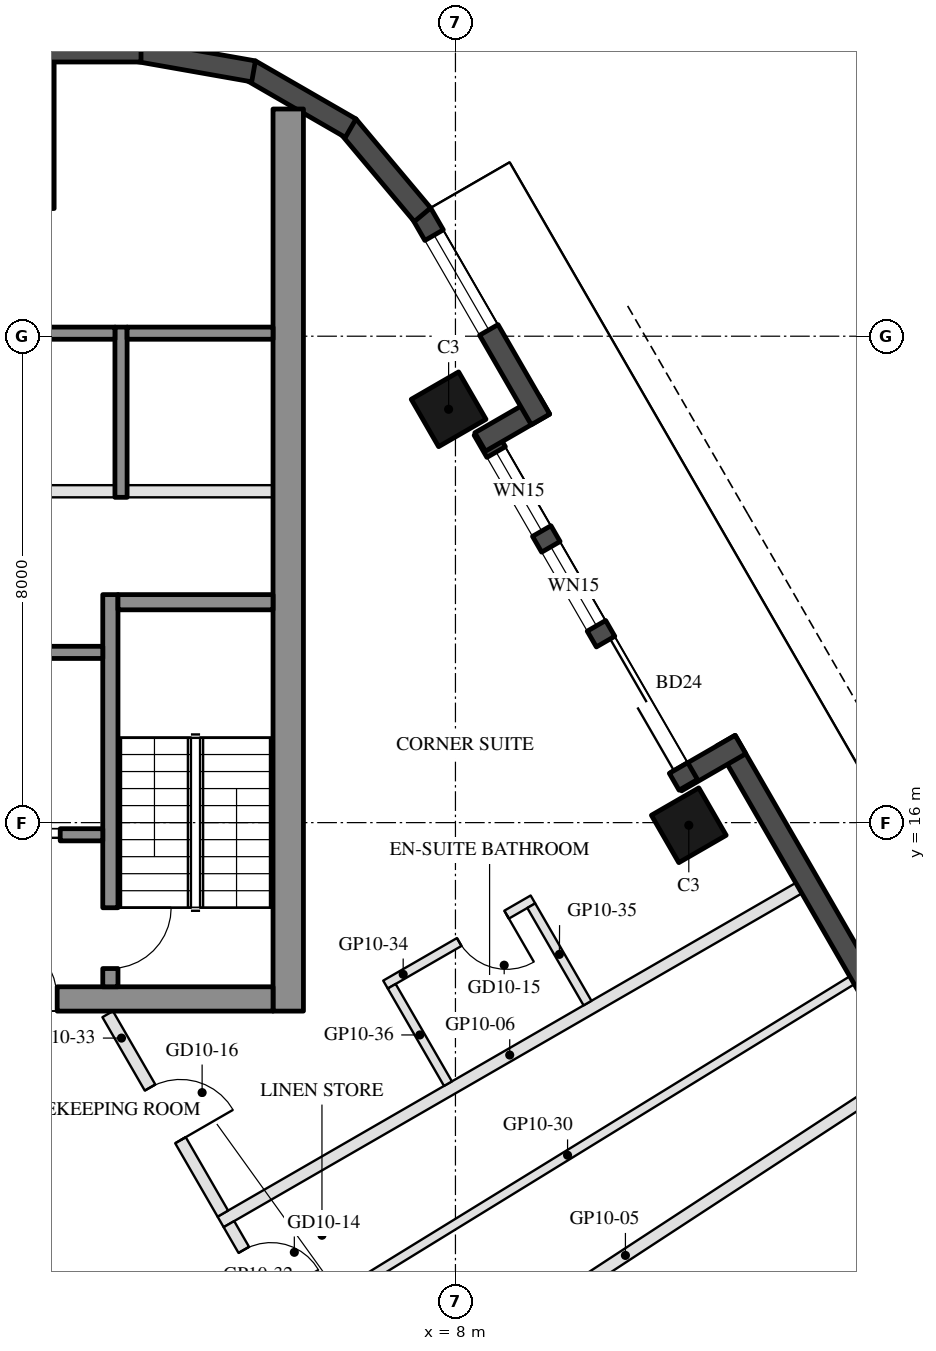
"""IFC4 building model, lengths in metres.
Left out: names, types, materials, properties, quantities, classifications, styles, units other than length and angle.
Written with IfcOpenShell. Run it as: python <this file> out.ifc"""

import sys

from ifc_helpers import new_model, si_unit, direction, frame, frame_2d, origin, origin_2d, place, context, subcontext, project, spatial, rectangle, hollow_rectangle, extrude, element, fill, save


model = new_model("IFC4")
c1 = context("Model", 3, precision=1e-05, world=origin(), true_north=direction((0.0, 1.0)))
c2 = subcontext(c1, "Body", "Model", "MODEL_VIEW")
j1 = project(units=[si_unit("LENGTHUNIT", "METRE"), si_unit("PLANEANGLEUNIT", "RADIAN")], contexts=[c1])
p1 = place(None, origin())
s1 = spatial("IfcSite", under=j1, at=p1, CompositionType="ELEMENT")
p2 = place(p1, origin())
s2 = spatial("IfcBuilding", under=s1, at=p2, CompositionType="ELEMENT")
p3 = place(p2, frame((0.0, 0.0, 120.5)))
s3 = spatial("IfcBuildingStorey", under=s2, at=p3, CompositionType="ELEMENT", Elevation=120.5)
for number, where, z_axis, x_axis in (
    (1, (11.838, 15.957, 0.0), (0.0, 0.0, 1.0), (-0.5, 0.866, 0.0)),
    (2, (7.888, 22.798, 0.0), (0.0, 0.0, 1.0), (-0.5, 0.866, 0.0)),
):
    element("IfcColumn", number, at=place(p3, frame(where, z_axis=z_axis, x_axis=x_axis)), inside=s3, PredefinedType="COLUMN", context=c2, shape_type="SweptSolid", body=[
        extrude(hollow_rectangle(XDim=0.9, YDim=0.9, WallThickness=0.04, at=origin_2d()), origin(), (0.0, 0.0, 1.0), 3.7),
    ])
p4 = place(p3, frame((0.0, 27.3, 0.0), z_axis=(0.0, 0.0, 1.0), x_axis=(1.0, 0.0, 0.0)))
e3 = element("IfcColumn", 3, at=p4, inside=s3, PredefinedType="COLUMN", context=c2, shape_type="SweptSolid", body=[
    extrude(hollow_rectangle(XDim=2.8, YDim=2.4, WallThickness=0.07, at=origin_2d()), origin(), (0.0, 0.0, 1.0), 3.7),
])
p5 = place(p3, frame((17.299, 8.948, 0.0), z_axis=(0.0, 0.0, 1.0), x_axis=(-0.500010041276, 0.866019606374, 0.0)))
e4 = element("IfcWall", 4, at=p5, inside=s3, PredefinedType="SOLIDWALL", context=c2, shape_type="SweptSolid", body=[
    extrude(rectangle(XDim=9.7, YDim=0.35, at=frame_2d((4.85, 0.0))), origin(), (0.0, 0.0, 1.0), 3.55),
])
p6 = place(p5, frame((1.725, 0.0, 0.0)))
e5 = element("IfcOpeningElement", 5, at=p6, cuts=e4, PredefinedType="OPENING", context=c2, shape_type="SweptSolid", body=[
    extrude(rectangle(XDim=1.3, YDim=2.4, at=frame_2d((0.65, 1.2))), frame((0.0, 0.185, 0.0), z_axis=(0.0, -1.0, 0.0), x_axis=(1.0, 0.0, 0.0)), (0.0, 0.0, 1.0), 0.37),
])
p7 = place(p3, frame((12.688, 17.284, 0.0), z_axis=(0.0, 0.0, 1.0), x_axis=(-0.865955602162, -0.500120880472, 0.0)))
e6 = element("IfcWall", 6, at=p7, inside=s3, PredefinedType="SOLIDWALL", context=c2, shape_type="SweptSolid", body=[
    extrude(rectangle(XDim=1.22, YDim=0.35, at=frame_2d((0.61, 0.0))), origin(), (0.0, 0.0, 1.0), 3.55),
])
p8 = place(p3, frame((11.829, 16.621, 0.0), z_axis=(0.0, 0.0, 1.0), x_axis=(-0.500003597184, 0.866023326939, 0.0)))
e7 = element("IfcWall", 7, at=p8, inside=s3, PredefinedType="SOLIDWALL", context=c2, shape_type="SweptSolid", body=[
    extrude(rectangle(XDim=6.74, YDim=0.35, at=frame_2d((3.37, 0.0))), origin(), (0.0, 0.0, 1.0), 3.55),
])
p9 = place(p8, frame((0.32, 0.0, 0.0)))
e8 = element("IfcOpeningElement", 8, at=p9, cuts=e7, PredefinedType="OPENING", context=c2, shape_type="SweptSolid", body=[
    extrude(rectangle(XDim=2.4, YDim=2.4, at=frame_2d((1.2, 1.2))), frame((0.0, 0.185, 0.0), z_axis=(0.0, -1.0, 0.0), x_axis=(1.0, 0.0, 0.0)), (0.0, 0.0, 1.0), 0.37),
])
p10 = place(p8, frame((3.02, 0.0, 0.3)))
e9 = element("IfcOpeningElement", 9, at=p10, cuts=e7, PredefinedType="OPENING", context=c2, shape_type="SweptSolid", body=[
    extrude(rectangle(XDim=1.5, YDim=2.65, at=frame_2d((0.75, 1.325))), frame((0.0, 0.185, 0.0), z_axis=(0.0, -1.0, 0.0), x_axis=(1.0, 0.0, 0.0)), (0.0, 0.0, 1.0), 0.37),
])
p11 = place(p8, frame((4.82, 0.0, 0.3)))
e10 = element("IfcOpeningElement", 10, at=p11, cuts=e7, PredefinedType="OPENING", context=c2, shape_type="SweptSolid", body=[
    extrude(rectangle(XDim=1.5, YDim=2.65, at=frame_2d((0.75, 1.325))), frame((0.0, 0.185, 0.0), z_axis=(0.0, -1.0, 0.0), x_axis=(1.0, 0.0, 0.0)), (0.0, 0.0, 1.0), 0.37),
])
p12 = place(p3, frame((8.406, 22.26, 0.0), z_axis=(0.0, 0.0, 1.0), x_axis=(0.865955602162, 0.500120880472, 0.0)))
e11 = element("IfcWall", 11, at=p12, inside=s3, PredefinedType="SOLIDWALL", context=c2, shape_type="SweptSolid", body=[
    extrude(rectangle(XDim=1.22, YDim=0.35, at=frame_2d((0.61, 0.0))), origin(), (0.0, 0.0, 1.0), 3.55),
])
p13 = place(p3, frame((9.398, 22.631, 0.0), z_axis=(0.0, 0.0, 1.0), x_axis=(-0.499954521343, 0.866051659307, 0.0)))
e12 = element("IfcWall", 12, at=p13, inside=s3, PredefinedType="SOLIDWALL", context=c2, shape_type="SweptSolid", body=[
    extrude(rectangle(XDim=3.916, YDim=0.35, at=frame_2d((1.958, 0.0))), origin(), (0.0, 0.0, 1.0), 3.55),
])
p14 = place(p13, frame((1.7, 0.0, 0.3)))
e13 = element("IfcOpeningElement", 13, at=p14, cuts=e12, PredefinedType="OPENING", context=c2, shape_type="SweptSolid", body=[
    extrude(rectangle(XDim=1.8, YDim=2.65, at=frame_2d((0.9, 1.325))), frame((0.0, 0.185, 0.0), z_axis=(0.0, -1.0, 0.0), x_axis=(1.0, 0.0, 0.0)), (0.0, 0.0, 1.0), 0.37),
])
p15 = place(p3, frame((7.458, 25.998, 0.0), z_axis=(0.0, 0.0, 1.0), x_axis=(-0.642808304945, 0.766027077259, 0.0)))
e14 = element("IfcWall", 14, at=p15, inside=s3, PredefinedType="SOLIDWALL", context=c2, shape_type="SweptSolid", body=[
    extrude(rectangle(XDim=1.91, YDim=0.35, at=frame_2d((0.955, 0.0))), origin(), (0.0, 0.0, 1.0), 3.55),
])
for number, where, z_axis, x_axis in (
    (15, (6.277, 27.422, 0.0), (0.0, 0.0, 1.0), (-0.866, 0.5, 0.0)),
    (16, (4.68, 28.356, 0.0), (0.0, 0.0, 1.0), (-0.985, 0.174, 0.0)),
):
    element("IfcWall", number, at=place(p3, frame(where, z_axis=z_axis, x_axis=x_axis)), inside=s3, PredefinedType="SOLIDWALL", context=c2, shape_type="SweptSolid", body=[
        extrude(rectangle(XDim=1.91, YDim=0.35, at=frame_2d((0.955, 0.0))), origin(), (0.0, 0.0, 1.0), 3.55),
    ])
p16 = place(p3, frame((2.829, 28.685, 0.0), z_axis=(0.0, 0.0, 1.0), x_axis=(-1.0, 0.0, 0.0)))
e17 = element("IfcWall", 17, at=p16, inside=s3, PredefinedType="SOLIDWALL", context=c2, shape_type="SweptSolid", body=[
    extrude(rectangle(XDim=5.658, YDim=0.35, at=frame_2d((2.829, 0.0))), origin(), (0.0, 0.0, 1.0), 3.55),
])
p17 = place(p3, frame((5.25, 12.9, 0.0), z_axis=(0.0, 0.0, 1.0), x_axis=(0.0, 1.0, 0.0)))
e18 = element("IfcWall", 18, at=p17, inside=s3, PredefinedType="SHEAR", context=c2, shape_type="SweptSolid", body=[
    extrude(rectangle(XDim=14.837, YDim=0.5, at=frame_2d((7.418, 0.0))), origin(), (0.0, 0.0, 1.0), 3.5),
])
p18 = place(p3, frame((5.0, 13.1, 0.0), z_axis=(0.0, 0.0, 1.0), x_axis=(-1.0, 0.0, 0.0)))
e19 = element("IfcWall", 19, at=p18, inside=s3, PredefinedType="SHEAR", context=c2, shape_type="SweptSolid", body=[
    extrude(rectangle(XDim=10.0, YDim=0.4, at=frame_2d((5.0, 0.0))), origin(), (0.0, 0.0, 1.0), 3.5),
])
p19 = place(p18, frame((3.55, 0.0, 0.0)))
e20 = element("IfcOpeningElement", 20, at=p19, cuts=e19, PredefinedType="OPENING", context=c2, shape_type="SweptSolid", body=[
    extrude(rectangle(XDim=1.1, YDim=2.1, at=frame_2d((0.55, 1.05))), frame((0.0, 0.21, 0.0), z_axis=(0.0, -1.0, 0.0), x_axis=(1.0, 0.0, 0.0)), (0.0, 0.0, 1.0), 0.42),
])
p20 = place(p18, frame((5.85, 0.0, 0.0)))
e21 = element("IfcOpeningElement", 21, at=p20, cuts=e19, PredefinedType="OPENING", context=c2, shape_type="SweptSolid", body=[
    extrude(rectangle(XDim=1.4, YDim=2.1, at=frame_2d((0.7, 1.05))), frame((0.0, 0.21, 0.0), z_axis=(0.0, -1.0, 0.0), x_axis=(1.0, 0.0, 0.0)), (0.0, 0.0, 1.0), 0.42),
])
p21 = place(p3, frame((2.325, 13.3, 0.0), z_axis=(0.0, 0.0, 1.0), x_axis=(0.0, 1.0, 0.0)))
e22 = element("IfcWall", 22, at=p21, inside=s3, PredefinedType="SHEAR", context=c2, shape_type="SweptSolid", body=[
    extrude(rectangle(XDim=6.45, YDim=0.25, at=frame_2d((3.225, 0.0))), origin(), (0.0, 0.0, 1.0), 3.5),
])
p22 = place(p21, frame((0.3, 0.0, 0.0)))
e23 = element("IfcOpeningElement", 23, at=p22, cuts=e22, PredefinedType="OPENING", context=c2, shape_type="SweptSolid", body=[
    extrude(rectangle(XDim=1.0, YDim=2.1, at=frame_2d((0.5, 1.05))), frame((0.0, 0.135, 0.0), z_axis=(0.0, -1.0, 0.0), x_axis=(1.0, 0.0, 0.0)), (0.0, 0.0, 1.0), 0.27),
])
p23 = place(p3, frame((5.0, 19.625, 0.0), z_axis=(0.0, 0.0, 1.0), x_axis=(-1.0, 0.0, 0.0)))
e24 = element("IfcWall", 24, at=p23, inside=s3, PredefinedType="SHEAR", context=c2, shape_type="SweptSolid", body=[
    extrude(rectangle(XDim=2.55, YDim=0.25, at=frame_2d((1.275, 0.0))), origin(), (0.0, 0.0, 1.0), 3.5),
])
p24 = place(p3, frame((2.2, 18.8, 0.0), z_axis=(0.0, 0.0, 1.0), x_axis=(-1.0, 0.0, 0.0)))
e25 = element("IfcWall", 25, at=p24, inside=s3, PredefinedType="SHEAR", context=c2, shape_type="SweptSolid", body=[
    extrude(rectangle(XDim=2.8, YDim=0.2, at=frame_2d((1.4, 0.0))), origin(), (0.0, 0.0, 1.0), 3.5),
])
p25 = place(p3, frame((2.2, 15.8, 0.0), z_axis=(0.0, 0.0, 1.0), x_axis=(-1.0, 0.0, 0.0)))
e26 = element("IfcWall", 26, at=p25, inside=s3, PredefinedType="SHEAR", context=c2, shape_type="SweptSolid", body=[
    extrude(rectangle(XDim=2.8, YDim=0.2, at=frame_2d((1.4, 0.0))), origin(), (0.0, 0.0, 1.0), 3.5),
])
p26 = place(p25, frame((0.7, 0.0, 0.0)))
e27 = element("IfcOpeningElement", 27, at=p26, cuts=e26, PredefinedType="OPENING", context=c2, shape_type="SweptSolid", body=[
    extrude(rectangle(XDim=1.2, YDim=2.1, at=frame_2d((0.6, 1.05))), frame((0.0, 0.11, 0.0), z_axis=(0.0, -1.0, 0.0), x_axis=(1.0, 0.0, 0.0)), (0.0, 0.0, 1.0), 0.22),
])
p27 = place(p3, frame((2.5, 21.35, 0.0), z_axis=(0.0, 0.0, 1.0), x_axis=(0.0, 1.0, 0.0)))
e28 = element("IfcWall", 28, at=p27, inside=s3, PredefinedType="SHEAR", context=c2, shape_type="SweptSolid", body=[
    extrude(rectangle(XDim=2.8, YDim=0.2, at=frame_2d((1.4, 0.0))), origin(), (0.0, 0.0, 1.0), 3.5),
])
p28 = place(p3, frame((5.0, 24.05, 0.0), z_axis=(0.0, 0.0, 1.0), x_axis=(-1.0, 0.0, 0.0)))
e29 = element("IfcWall", 29, at=p28, inside=s3, PredefinedType="SHEAR", context=c2, shape_type="SweptSolid", body=[
    extrude(rectangle(XDim=2.4, YDim=0.2, at=frame_2d((1.2, 0.0))), origin(), (0.0, 0.0, 1.0), 3.5),
])
p29 = place(p3, frame((2.4, 24.05, 0.0), z_axis=(0.0, 0.0, 1.0), x_axis=(-1.0, 0.0, 0.0)))
e30 = element("IfcWall", 30, at=p29, inside=s3, PredefinedType="SHEAR", context=c2, shape_type="SweptSolid", body=[
    extrude(rectangle(XDim=2.8, YDim=0.2, at=frame_2d((1.4, 0.0))), origin(), (0.0, 0.0, 1.0), 3.5),
])
p30 = place(p3, frame((5.0, 21.45, 0.0), z_axis=(0.0, 0.0, 1.0), x_axis=(-1.0, 0.0, 0.0)))
e31 = element("IfcWall", 31, at=p30, inside=s3, PredefinedType="PARTITIONING", context=c2, shape_type="SweptSolid", body=[
    extrude(rectangle(XDim=2.4, YDim=0.2, at=frame_2d((1.2, 0.0))), origin(), (0.0, 0.0, 1.0), 3.5),
])
p31 = place(p3, frame((2.4, 21.45, 0.0), z_axis=(0.0, 0.0, 1.0), x_axis=(-1.0, 0.0, 0.0)))
e32 = element("IfcWall", 32, at=p31, inside=s3, PredefinedType="PARTITIONING", context=c2, shape_type="SweptSolid", body=[
    extrude(rectangle(XDim=2.8, YDim=0.2, at=frame_2d((1.4, 0.0))), origin(), (0.0, 0.0, 1.0), 3.5),
])
p32 = place(p3, frame((15.397, 11.892, 0.0), z_axis=(0.0, 0.0, 1.0), x_axis=(-0.836898817878, -0.547357624076, 0.0)))
e33 = element("IfcWall", 33, at=p32, inside=s3, PredefinedType="PARTITIONING", context=c2, shape_type="SweptSolid", body=[
    extrude(rectangle(XDim=10.997, YDim=0.2, at=frame_2d((5.499, 0.0))), origin(), (0.0, 0.0, 1.0), 2.96),
])
p33 = place(p3, frame((13.647, 14.923, 0.0), z_axis=(0.0, 0.0, 1.0), x_axis=(-0.866027479907, -0.499996404033, 0.0)))
e34 = element("IfcWall", 34, at=p33, inside=s3, PredefinedType="PARTITIONING", context=c2, shape_type="SweptSolid", body=[
    extrude(rectangle(XDim=10.98, YDim=0.2, at=frame_2d((5.49, 0.0))), origin(), (0.0, 0.0, 1.0), 2.96),
])
p34 = place(p3, frame((14.522, 13.407, 0.0), z_axis=(0.0, 0.0, 1.0), x_axis=(-0.851781158383, -0.523897755506, 0.0)))
e35 = element("IfcWall", 35, at=p34, inside=s3, PredefinedType="PARTITIONING", context=c2, shape_type="SweptSolid", body=[
    extrude(rectangle(XDim=10.984, YDim=0.15, at=frame_2d((5.492, 0.0))), origin(), (0.0, 0.0, 1.0), 2.95),
])
p35 = place(p3, frame((4.275, 9.396, 0.0), z_axis=(0.0, 0.0, 1.0), x_axis=(0.499928798138, -0.866066508296, 0.0)))
e36 = element("IfcWall", 36, at=p35, inside=s3, PredefinedType="PARTITIONING", context=c2, shape_type="SweptSolid", body=[
    extrude(rectangle(XDim=1.878, YDim=0.2, at=frame_2d((0.939, 0.0))), origin(), (0.0, 0.0, 1.0), 3.55),
])
p36 = place(p35, frame((0.489, 0.0, 0.0)))
e37 = element("IfcOpeningElement", 37, at=p36, cuts=e36, PredefinedType="OPENING", context=c2, shape_type="SweptSolid", body=[
    extrude(rectangle(XDim=0.9, YDim=2.1, at=frame_2d((0.45, 1.05))), frame((0.0, 0.11, 0.0), z_axis=(0.0, -1.0, 0.0), x_axis=(1.0, 0.0, 0.0)), (0.0, 0.0, 1.0), 0.22),
])
p37 = place(p3, frame((2.281, 12.85, 0.0), z_axis=(0.0, 0.0, 1.0), x_axis=(0.499979074716, -0.866037484666, 0.0)))
e38 = element("IfcWall", 38, at=p37, inside=s3, PredefinedType="PARTITIONING", context=c2, shape_type="SweptSolid", body=[
    extrude(rectangle(XDim=3.788, YDim=0.2, at=frame_2d((1.894, 0.0))), origin(), (0.0, 0.0, 1.0), 2.95),
])
p38 = place(p37, frame((1.394, 0.0, 0.0)))
e39 = element("IfcOpeningElement", 39, at=p38, cuts=e38, PredefinedType="OPENING", context=c2, shape_type="SweptSolid", body=[
    extrude(rectangle(XDim=1.0, YDim=2.1, at=frame_2d((0.5, 1.05))), frame((0.0, 0.11, 0.0), z_axis=(0.0, -1.0, 0.0), x_axis=(1.0, 0.0, 0.0)), (0.0, 0.0, 1.0), 0.22),
])
p39 = place(p3, frame((9.274, 14.737, 0.0), z_axis=(0.0, 0.0, 1.0), x_axis=(-0.866018616679, -0.500011755427, 0.0)))
e40 = element("IfcWall", 40, at=p39, inside=s3, PredefinedType="PARTITIONING", context=c2, shape_type="SweptSolid", body=[
    extrude(rectangle(XDim=2.8, YDim=0.15, at=frame_2d((1.4, 0.0))), origin(), (0.0, 0.0, 1.0), 3.55),
])
p40 = place(p39, frame((0.5, 0.0, 0.0)))
e41 = element("IfcOpeningElement", 41, at=p40, cuts=e40, PredefinedType="OPENING", context=c2, shape_type="SweptSolid", body=[
    extrude(rectangle(XDim=0.9, YDim=2.1, at=frame_2d((0.45, 1.05))), frame((0.0, 0.085, 0.0), z_axis=(0.0, -1.0, 0.0), x_axis=(1.0, 0.0, 0.0)), (0.0, 0.0, 1.0), 0.17),
])
p41 = place(p3, frame((10.172, 13.032, 0.0), z_axis=(0.0, 0.0, 1.0), x_axis=(-0.500042316284, 0.866000971088, 0.0)))
e42 = element("IfcWall", 42, at=p41, inside=s3, PredefinedType="PARTITIONING", context=c2, shape_type="SweptSolid", body=[
    extrude(rectangle(XDim=1.85, YDim=0.15, at=frame_2d((0.925, 0.0))), origin(), (0.0, 0.0, 1.0), 2.95),
])
p42 = place(p3, frame((7.877, 11.707, 0.0), z_axis=(0.0, 0.0, 1.0), x_axis=(-0.499985172903, 0.866033964044, 0.0)))
e43 = element("IfcWall", 43, at=p42, inside=s3, PredefinedType="PARTITIONING", context=c2, shape_type="SweptSolid", body=[
    extrude(rectangle(XDim=1.85, YDim=0.15, at=frame_2d((0.925, 0.0))), origin(), (0.0, 0.0, 1.0), 2.95),
])
p43 = place(p9, frame((2.4, 0.0, 0.0), z_axis=(0.0, 0.0, 1.0), x_axis=(-1.0, 0.0, 0.0)))
e44 = element("IfcDoor", 44, at=p43, inside=s3, OperationType="SLIDING_TO_LEFT", PredefinedType="DOOR", context=c2, shape_type="SweptSolid", body=[
    extrude(rectangle(XDim=2.4, YDim=2.4, at=frame_2d((1.2, 1.2))), frame((0.0, 0.025, 0.0), z_axis=(0.0, -1.0, 0.0), x_axis=(1.0, 0.0, 0.0)), (0.0, 0.0, 1.0), 0.05),
])
fill(e8, e44)
p44 = place(p10, origin())
e45 = element("IfcWindow", 45, at=p44, inside=s3, PartitioningType="SINGLE_PANEL", PredefinedType="WINDOW", context=c2, shape_type="SweptSolid", body=[
    extrude(rectangle(XDim=1.5, YDim=2.65, at=frame_2d((0.75, 1.325))), frame((0.0, 0.03, 0.0), z_axis=(0.0, -1.0, 0.0), x_axis=(1.0, 0.0, 0.0)), (0.0, 0.0, 1.0), 0.06),
])
fill(e9, e45)
p45 = place(p11, origin())
e46 = element("IfcWindow", 46, at=p45, inside=s3, PartitioningType="SINGLE_PANEL", PredefinedType="WINDOW", context=c2, shape_type="SweptSolid", body=[
    extrude(rectangle(XDim=1.5, YDim=2.65, at=frame_2d((0.75, 1.325))), frame((0.0, 0.03, 0.0), z_axis=(0.0, -1.0, 0.0), x_axis=(1.0, 0.0, 0.0)), (0.0, 0.0, 1.0), 0.06),
])
fill(e10, e46)
p46 = place(p14, origin())
e47 = element("IfcWindow", 47, at=p46, inside=s3, PartitioningType="SINGLE_PANEL", PredefinedType="WINDOW", context=c2, shape_type="SweptSolid", body=[
    extrude(rectangle(XDim=1.8, YDim=2.65, at=frame_2d((0.9, 1.325))), frame((0.0, 0.03, 0.0), z_axis=(0.0, -1.0, 0.0), x_axis=(1.0, 0.0, 0.0)), (0.0, 0.0, 1.0), 0.06),
])
fill(e13, e47)
p47 = place(p26, origin())
e48 = element("IfcDoor", 48, at=p47, inside=s3, OperationType="DOUBLE_DOOR_SLIDING", PredefinedType="DOOR", context=c2, shape_type="SweptSolid", body=[
    extrude(rectangle(XDim=1.2, YDim=2.1, at=frame_2d((0.6, 1.05))), frame((0.0, 0.025, 0.0), z_axis=(0.0, -1.0, 0.0), x_axis=(1.0, 0.0, 0.0)), (0.0, 0.0, 1.0), 0.05),
])
fill(e27, e48)
p48 = place(p19, frame((1.1, 0.0, 0.0), z_axis=(0.0, 0.0, 1.0), x_axis=(-1.0, 0.0, 0.0)))
e49 = element("IfcDoor", 49, at=p48, inside=s3, OperationType="SINGLE_SWING_LEFT", PredefinedType="DOOR", context=c2, shape_type="SweptSolid", body=[
    extrude(rectangle(XDim=1.1, YDim=2.1, at=frame_2d((0.55, 1.05))), frame((0.0, 0.025, 0.0), z_axis=(0.0, -1.0, 0.0), x_axis=(1.0, 0.0, 0.0)), (0.0, 0.0, 1.0), 0.05),
])
fill(e20, e49)
p49 = place(p22, frame((1.0, 0.0, 0.0), z_axis=(0.0, 0.0, 1.0), x_axis=(-1.0, 0.0, 0.0)))
e50 = element("IfcDoor", 50, at=p49, inside=s3, OperationType="SINGLE_SWING_LEFT", PredefinedType="DOOR", context=c2, shape_type="SweptSolid", body=[
    extrude(rectangle(XDim=1.0, YDim=2.1, at=frame_2d((0.5, 1.05))), frame((0.0, 0.025, 0.0), z_axis=(0.0, -1.0, 0.0), x_axis=(1.0, 0.0, 0.0)), (0.0, 0.0, 1.0), 0.05),
])
fill(e23, e50)
p50 = place(p36, origin())
e51 = element("IfcDoor", 51, at=p50, inside=s3, OperationType="SINGLE_SWING_RIGHT", PredefinedType="DOOR", context=c2, shape_type="SweptSolid", body=[
    extrude(rectangle(XDim=0.9, YDim=2.1, at=frame_2d((0.45, 1.05))), frame((0.0, 0.025, 0.0), z_axis=(0.0, -1.0, 0.0), x_axis=(1.0, 0.0, 0.0)), (0.0, 0.0, 1.0), 0.05),
])
fill(e37, e51)
p51 = place(p40, origin())
e52 = element("IfcDoor", 52, at=p51, inside=s3, OperationType="SINGLE_SWING_LEFT", PredefinedType="DOOR", context=c2, shape_type="SweptSolid", body=[
    extrude(rectangle(XDim=0.9, YDim=2.1, at=frame_2d((0.45, 1.05))), frame((0.0, 0.025, 0.0), z_axis=(0.0, -1.0, 0.0), x_axis=(1.0, 0.0, 0.0)), (0.0, 0.0, 1.0), 0.05),
])
fill(e41, e52)
p52 = place(p38, origin())
e53 = element("IfcDoor", 53, at=p52, inside=s3, OperationType="SINGLE_SWING_RIGHT", PredefinedType="DOOR", context=c2, shape_type="SweptSolid", body=[
    extrude(rectangle(XDim=1.0, YDim=2.1, at=frame_2d((0.5, 1.05))), frame((0.0, 0.025, 0.0), z_axis=(0.0, -1.0, 0.0), x_axis=(1.0, 0.0, 0.0)), (0.0, 0.0, 1.0), 0.05),
])
fill(e39, e53)
save(model, sys.argv[1])
